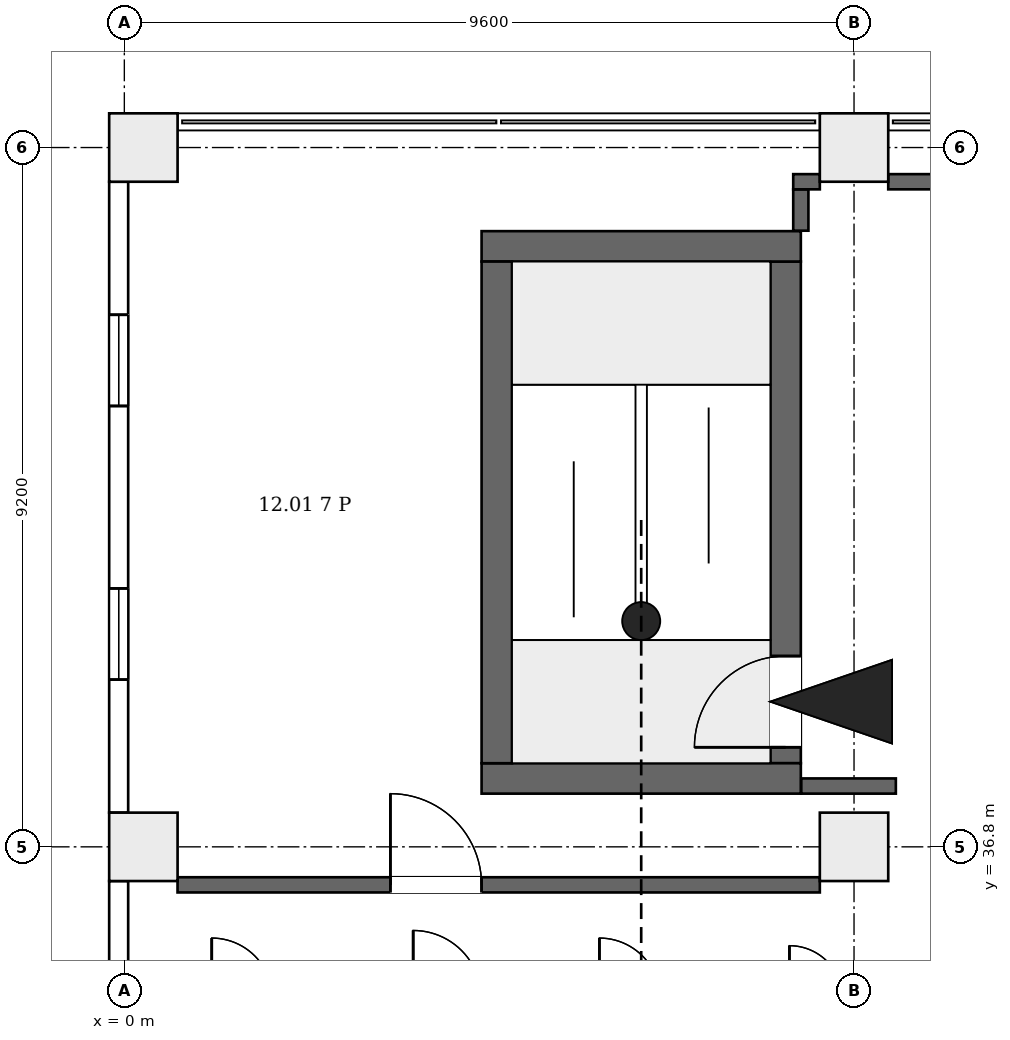
"""IFC4 building model, lengths in metres.
Left out: names, types, materials, properties, quantities, classifications, styles, units other than length and angle.
Written with IfcOpenShell. Run it as: python <this file> out.ifc"""

import sys

from ifc_helpers import new_model, si_unit, direction, frame, frame_2d, origin, origin_2d, place, context, subcontext, project, spatial, rectangle, extrude, element, fill, save


model = new_model("IFC4")
c1 = context("Model", 3, precision=1e-05, world=origin(), true_north=direction((0.0, 1.0)))
c2 = subcontext(c1, "Body", "Model", "MODEL_VIEW")
j1 = project(units=[si_unit("LENGTHUNIT", "METRE"), si_unit("PLANEANGLEUNIT", "RADIAN")], contexts=[c1])
p1 = place(None, origin())
s1 = spatial("IfcSite", under=j1, at=p1, CompositionType="ELEMENT")
p2 = place(p1, origin())
s2 = spatial("IfcBuilding", under=s1, at=p2, CompositionType="ELEMENT")
p3 = place(p2, frame((0.0, 0.0, 61.3)))
s3 = spatial("IfcBuildingStorey", under=s2, at=p3, CompositionType="ELEMENT", Elevation=61.3)
for number, where, z_axis, x_axis in (
    (1, (4.7, 37.7, 0.0), (0.0, 0.0, 1.0), (1.0, 0.0, 0.0)),
    (2, (4.7, 44.7, 0.0), (0.0, 0.0, 1.0), (1.0, 0.0, 0.0)),
):
    element("IfcWall", number, at=place(p3, frame(where, z_axis=z_axis, x_axis=x_axis)), inside=s3, PredefinedType="SHEAR", context=c2, shape_type="SweptSolid", body=[
        extrude(rectangle(XDim=4.2, YDim=0.4, at=frame_2d((2.1, 0.0))), origin(), (0.0, 0.0, 1.0), 4.2),
    ])
p4 = place(p3, frame((4.9, 37.9, 0.0), z_axis=(0.0, 0.0, 1.0), x_axis=(0.0, 1.0, 0.0)))
e3 = element("IfcWall", 3, at=p4, inside=s3, PredefinedType="SHEAR", context=c2, shape_type="SweptSolid", body=[
    extrude(rectangle(XDim=6.6, YDim=0.4, at=frame_2d((3.3, 0.0))), origin(), (0.0, 0.0, 1.0), 4.2),
])
p5 = place(p3, frame((8.7, 37.9, 0.0), z_axis=(0.0, 0.0, 1.0), x_axis=(0.0, 1.0, 0.0)))
e4 = element("IfcWall", 4, at=p5, inside=s3, PredefinedType="SHEAR", context=c2, shape_type="SweptSolid", body=[
    extrude(rectangle(XDim=6.6, YDim=0.4, at=frame_2d((3.3, 0.0))), origin(), (0.0, 0.0, 1.0), 4.2),
])
p6 = place(p5, frame((0.21, 0.0, 0.0)))
e5 = element("IfcOpeningElement", 5, at=p6, cuts=e4, PredefinedType="OPENING", context=c2, shape_type="SweptSolid", body=[
    extrude(rectangle(XDim=1.2, YDim=2.1, at=frame_2d((0.6, 1.05))), frame((0.0, 0.21, 0.0), z_axis=(0.0, -1.0, 0.0), x_axis=(1.0, 0.0, 0.0)), (0.0, 0.0, 1.0), 0.42),
])
for number, where, z_axis, x_axis in (
    (6, (0.25, 36.8, 0.0), (0.0, 0.0, 1.0), (1.0, 0.0, 0.0)),
    (7, (9.6, 36.8, 0.0), (0.0, 0.0, 1.0), (1.0, 0.0, 0.0)),
    (8, (0.25, 46.0, 0.0), (0.0, 0.0, 1.0), (1.0, 0.0, 0.0)),
    (9, (9.6, 46.0, 0.0), (0.0, 0.0, 1.0), (1.0, 0.0, 0.0)),
):
    element("IfcColumn", number, at=place(p3, frame(where, z_axis=z_axis, x_axis=x_axis)), inside=s3, PredefinedType="COLUMN", context=c2, shape_type="SweptSolid", body=[
        extrude(rectangle(XDim=0.9, YDim=0.9, at=origin_2d()), origin(), (0.0, 0.0, 1.0), 4.2),
    ])
p7 = place(p3, frame((-0.074, 36.35, 0.0), z_axis=(0.0, 0.0, 1.0), x_axis=(0.0, -1.0, 0.0)))
e10 = element("IfcWall", 10, at=p7, inside=s3, PredefinedType="ELEMENTEDWALL", context=c2, shape_type="SweptSolid", body=[
    extrude(rectangle(XDim=8.3, YDim=0.25, at=frame_2d((4.15, 0.0))), origin(), (0.0, 0.0, 1.0), 3.9),
])
p8 = place(p7, frame((5.35, 0.0, 0.9)))
e11 = element("IfcOpeningElement", 11, at=p8, cuts=e10, PredefinedType="OPENING", context=c2, shape_type="SweptSolid", body=[
    extrude(rectangle(XDim=1.2, YDim=2.6, at=frame_2d((0.6, 1.3))), frame((0.0, 0.135, 0.0), z_axis=(0.0, -1.0, 0.0), x_axis=(1.0, 0.0, 0.0)), (0.0, 0.0, 1.0), 0.27),
])
p9 = place(p7, frame((1.75, 0.0, 0.9)))
e12 = element("IfcOpeningElement", 12, at=p9, cuts=e10, PredefinedType="OPENING", context=c2, shape_type="SweptSolid", body=[
    extrude(rectangle(XDim=1.2, YDim=2.6, at=frame_2d((0.6, 1.3))), frame((0.0, 0.135, 0.0), z_axis=(0.0, -1.0, 0.0), x_axis=(1.0, 0.0, 0.0)), (0.0, 0.0, 1.0), 0.27),
])
p10 = place(p3, frame((-0.074, 45.55, 0.0), z_axis=(0.0, 0.0, 1.0), x_axis=(0.0, -1.0, 0.0)))
e13 = element("IfcWall", 13, at=p10, inside=s3, PredefinedType="ELEMENTEDWALL", context=c2, shape_type="SweptSolid", body=[
    extrude(rectangle(XDim=8.3, YDim=0.25, at=frame_2d((4.15, 0.0))), origin(), (0.0, 0.0, 1.0), 3.9),
])
p11 = place(p10, frame((5.35, 0.0, 0.9)))
e14 = element("IfcOpeningElement", 14, at=p11, cuts=e13, PredefinedType="OPENING", context=c2, shape_type="SweptSolid", body=[
    extrude(rectangle(XDim=1.2, YDim=2.6, at=frame_2d((0.6, 1.3))), frame((0.0, 0.135, 0.0), z_axis=(0.0, -1.0, 0.0), x_axis=(1.0, 0.0, 0.0)), (0.0, 0.0, 1.0), 0.27),
])
p12 = place(p10, frame((1.75, 0.0, 0.9)))
e15 = element("IfcOpeningElement", 15, at=p12, cuts=e13, PredefinedType="OPENING", context=c2, shape_type="SweptSolid", body=[
    extrude(rectangle(XDim=1.2, YDim=2.6, at=frame_2d((0.6, 1.3))), frame((0.0, 0.135, 0.0), z_axis=(0.0, -1.0, 0.0), x_axis=(1.0, 0.0, 0.0)), (0.0, 0.0, 1.0), 0.27),
])
p13 = place(p3, frame((0.7, 36.3, 0.0), z_axis=(0.0, 0.0, 1.0), x_axis=(1.0, 0.0, 0.0)))
e16 = element("IfcWall", 16, at=p13, inside=s3, PredefinedType="PARTITIONING", context=c2, shape_type="SweptSolid", body=[
    extrude(rectangle(XDim=8.45, YDim=0.2, at=frame_2d((4.225, 0.0))), origin(), (0.0, 0.0, 1.0), 3.9),
])
p14 = place(p13, frame((2.8, 0.0, 0.0)))
e17 = element("IfcOpeningElement", 17, at=p14, cuts=e16, PredefinedType="OPENING", context=c2, shape_type="SweptSolid", body=[
    extrude(rectangle(XDim=1.2, YDim=2.1, at=frame_2d((0.6, 1.05))), frame((0.0, 0.11, 0.0), z_axis=(0.0, -1.0, 0.0), x_axis=(1.0, 0.0, 0.0)), (0.0, 0.0, 1.0), 0.22),
])
p15 = place(p3, frame((8.9, 44.906, 0.0), z_axis=(0.0, 0.0, 1.0), x_axis=(0.0, 1.0, 0.0)))
e18 = element("IfcWall", 18, at=p15, inside=s3, PredefinedType="PARTITIONING", context=c2, shape_type="SweptSolid", body=[
    extrude(rectangle(XDim=0.544, YDim=0.2, at=frame_2d((0.272, 0.0))), origin(), (0.0, 0.0, 1.0), 3.9),
])
p16 = place(p3, frame((8.8, 45.55, 0.0), z_axis=(0.0, 0.0, 1.0), x_axis=(1.0, 0.0, 0.0)))
e19 = element("IfcWall", 19, at=p16, inside=s3, PredefinedType="PARTITIONING", context=c2, shape_type="SweptSolid", body=[
    extrude(rectangle(XDim=0.35, YDim=0.2, at=frame_2d((0.175, 0.0))), origin(), (0.0, 0.0, 1.0), 3.9),
])
p17 = place(p3, frame((8.906, 37.6, 0.0), z_axis=(0.0, 0.0, 1.0), x_axis=(1.0, 0.0, 0.0)))
e20 = element("IfcWall", 20, at=p17, inside=s3, PredefinedType="PARTITIONING", context=c2, shape_type="SweptSolid", body=[
    extrude(rectangle(XDim=1.244, YDim=0.2, at=frame_2d((0.622, 0.0))), origin(), (0.0, 0.0, 1.0), 3.9),
])
p18 = place(p3, frame((10.05, 45.55, 0.0), z_axis=(0.0, 0.0, 1.0), x_axis=(1.0, 0.0, 0.0)))
e21 = element("IfcWall", 21, at=p18, inside=s3, PredefinedType="PARTITIONING", context=c2, shape_type="SweptSolid", body=[
    extrude(rectangle(XDim=1.35, YDim=0.2, at=frame_2d((0.675, 0.0))), origin(), (0.0, 0.0, 1.0), 3.9),
])
p19 = place(p11, origin())
e22 = element("IfcWindow", 22, at=p19, inside=s3, PartitioningType="SINGLE_PANEL", PredefinedType="WINDOW", context=c2, shape_type="SweptSolid", body=[
    extrude(rectangle(XDim=1.2, YDim=2.6, at=frame_2d((0.6, 1.3))), frame((0.0, 0.03, 0.0), z_axis=(0.0, -1.0, 0.0), x_axis=(1.0, 0.0, 0.0)), (0.0, 0.0, 1.0), 0.06),
])
fill(e14, e22)
p20 = place(p12, origin())
e23 = element("IfcWindow", 23, at=p20, inside=s3, PartitioningType="SINGLE_PANEL", PredefinedType="WINDOW", context=c2, shape_type="SweptSolid", body=[
    extrude(rectangle(XDim=1.2, YDim=2.6, at=frame_2d((0.6, 1.3))), frame((0.0, 0.03, 0.0), z_axis=(0.0, -1.0, 0.0), x_axis=(1.0, 0.0, 0.0)), (0.0, 0.0, 1.0), 0.06),
])
fill(e15, e23)
p21 = place(p6, origin())
e24 = element("IfcDoor", 24, at=p21, inside=s3, OperationType="SINGLE_SWING_RIGHT", PredefinedType="DOOR", context=c2, shape_type="SweptSolid", body=[
    extrude(rectangle(XDim=1.2, YDim=2.1, at=frame_2d((0.6, 1.05))), frame((0.0, 0.025, 0.0), z_axis=(0.0, -1.0, 0.0), x_axis=(1.0, 0.0, 0.0)), (0.0, 0.0, 1.0), 0.05),
])
fill(e5, e24)
p22 = place(p14, origin())
e25 = element("IfcDoor", 25, at=p22, inside=s3, OperationType="SINGLE_SWING_RIGHT", PredefinedType="DOOR", context=c2, shape_type="SweptSolid", body=[
    extrude(rectangle(XDim=1.2, YDim=2.1, at=frame_2d((0.6, 1.05))), frame((0.0, 0.025, 0.0), z_axis=(0.0, -1.0, 0.0), x_axis=(1.0, 0.0, 0.0)), (0.0, 0.0, 1.0), 0.05),
])
fill(e17, e25)
save(model, sys.argv[1])
